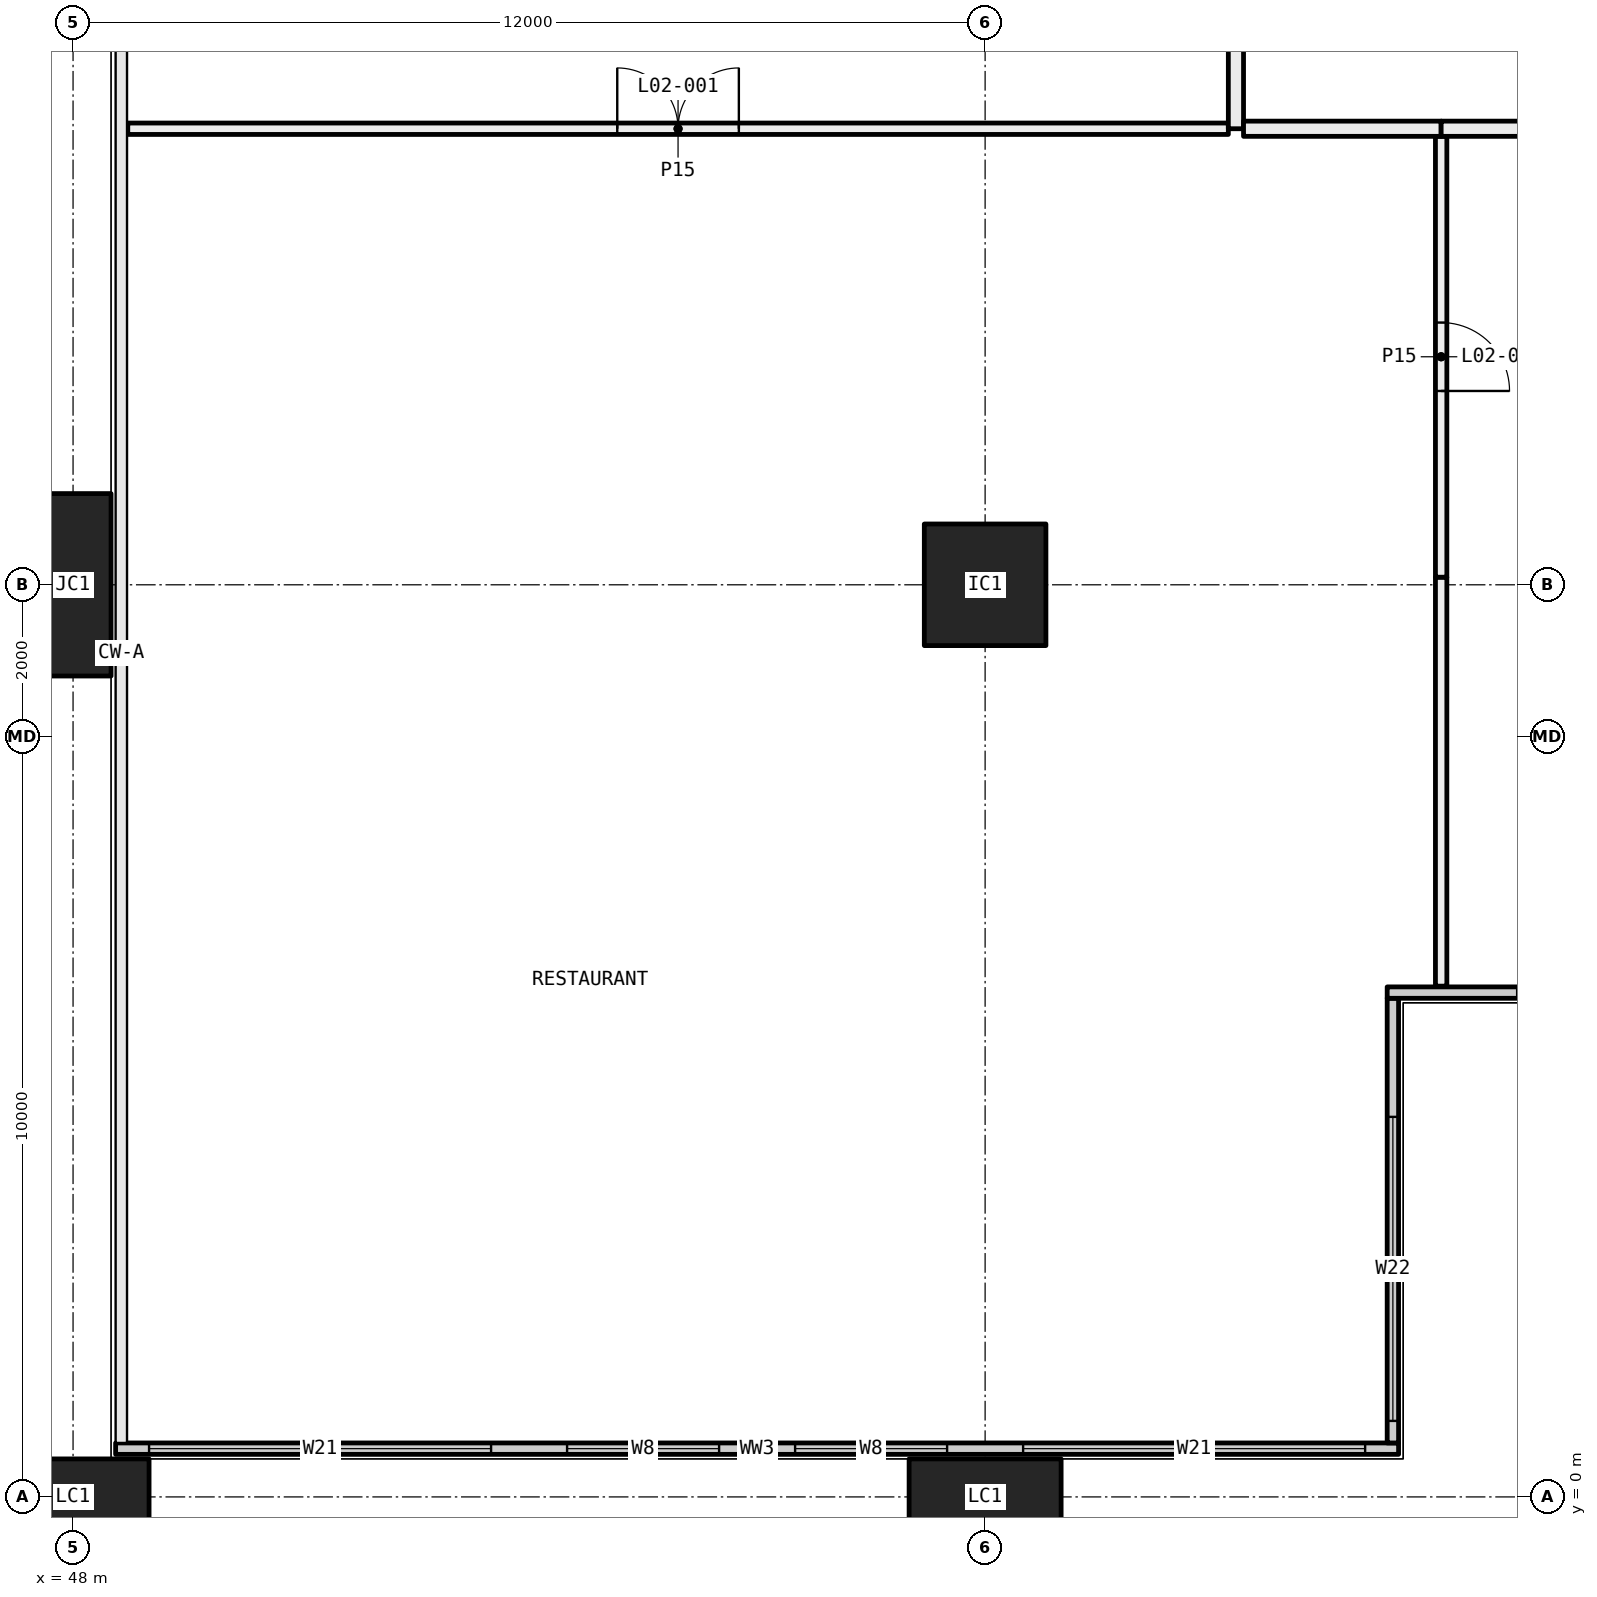
"""IFC4 building model, lengths in metres.
Left out: names, types, materials, properties, quantities, classifications, styles, units other than length and angle.
Written with IfcOpenShell. Run it as: python <this file> out.ifc"""

import sys

from ifc_helpers import new_model, si_unit, direction, frame, frame_2d, origin, origin_2d, place, context, subcontext, project, spatial, rectangle, hollow_rectangle, extrude, element, fill, save


model = new_model("IFC4")
c1 = context("Model", 3, precision=1e-05, world=origin(), true_north=direction((0.0, 1.0)))
c2 = subcontext(c1, "Body", "Model", "MODEL_VIEW")
j1 = project(units=[si_unit("LENGTHUNIT", "METRE"), si_unit("PLANEANGLEUNIT", "RADIAN")], contexts=[c1])
p1 = place(None, origin())
s1 = spatial("IfcSite", under=j1, at=p1, CompositionType="ELEMENT")
p2 = place(p1, origin())
s2 = spatial("IfcBuilding", under=s1, at=p2, CompositionType="ELEMENT")
p3 = place(p2, frame((0.0, 0.0, 12.0)))
s3 = spatial("IfcBuildingStorey", under=s2, at=p3, CompositionType="ELEMENT", Elevation=12.0)
p4 = place(p3, frame((48.0, 0.0, -0.4), z_axis=(0.0, 0.0, 1.0), x_axis=(1.0, 0.0, 0.0)))
e1 = element("IfcColumn", 1, at=p4, inside=s3, PredefinedType="COLUMN", context=c2, shape_type="SweptSolid", body=[
    extrude(hollow_rectangle(XDim=2.0, YDim=1.0, WallThickness=0.08, at=origin_2d()), origin(), (0.0, 0.0, 1.0), 6.0),
])
p5 = place(p3, frame((48.0, 12.0, -0.4), z_axis=(0.0, 0.0, 1.0), x_axis=(0.0, 1.0, 0.0)))
e2 = element("IfcColumn", 2, at=p5, inside=s3, PredefinedType="COLUMN", context=c2, shape_type="SweptSolid", body=[
    extrude(hollow_rectangle(XDim=2.4, YDim=1.0, WallThickness=0.09, at=origin_2d()), origin(), (0.0, 0.0, 1.0), 6.0),
])
p6 = place(p3, frame((60.0, 0.0, -0.4), z_axis=(0.0, 0.0, 1.0), x_axis=(1.0, 0.0, 0.0)))
e3 = element("IfcColumn", 3, at=p6, inside=s3, PredefinedType="COLUMN", context=c2, shape_type="SweptSolid", body=[
    extrude(hollow_rectangle(XDim=2.0, YDim=1.0, WallThickness=0.08, at=origin_2d()), origin(), (0.0, 0.0, 1.0), 6.0),
])
p7 = place(p3, frame((60.0, 12.0, 0.0), z_axis=(0.0, 0.0, 1.0), x_axis=(1.0, 0.0, 0.0)))
e4 = element("IfcColumn", 4, at=p7, inside=s3, PredefinedType="COLUMN", context=c2, shape_type="SweptSolid", body=[
    extrude(hollow_rectangle(XDim=1.6, YDim=1.6, WallThickness=0.07, at=origin_2d()), origin(), (0.0, 0.0, 1.0), 5.6),
])
p8 = place(p3, frame((48.56, 0.635, 0.0), z_axis=(0.0, 0.0, 1.0), x_axis=(1.0, 0.0, 0.0)))
e5 = element("IfcWall", 5, at=p8, inside=s3, PredefinedType="ELEMENTEDWALL", context=c2, shape_type="SweptSolid", body=[
    extrude(rectangle(XDim=16.88, YDim=0.15, at=frame_2d((8.44, 0.0))), origin(), (0.0, 0.0, 1.0), 5.6),
])
p9 = place(p8, frame((0.44, 0.0, 0.45)))
e6 = element("IfcOpeningElement", 6, at=p9, cuts=e5, PredefinedType="OPENING", context=c2, shape_type="SweptSolid", body=[
    extrude(rectangle(XDim=4.5, YDim=5.1, at=frame_2d((2.25, 2.55))), frame((0.0, 0.085, 0.0), z_axis=(0.0, -1.0, 0.0), x_axis=(1.0, 0.0, 0.0)), (0.0, 0.0, 1.0), 0.17),
])
p10 = place(p8, frame((5.94, 0.0, 0.45)))
e7 = element("IfcOpeningElement", 7, at=p10, cuts=e5, PredefinedType="OPENING", context=c2, shape_type="SweptSolid", body=[
    extrude(rectangle(XDim=2.0, YDim=5.1, at=frame_2d((1.0, 2.55))), frame((0.0, 0.085, 0.0), z_axis=(0.0, -1.0, 0.0), x_axis=(1.0, 0.0, 0.0)), (0.0, 0.0, 1.0), 0.17),
])
p11 = place(p8, frame((8.94, 0.0, 0.45)))
e8 = element("IfcOpeningElement", 8, at=p11, cuts=e5, PredefinedType="OPENING", context=c2, shape_type="SweptSolid", body=[
    extrude(rectangle(XDim=2.0, YDim=5.1, at=frame_2d((1.0, 2.55))), frame((0.0, 0.085, 0.0), z_axis=(0.0, -1.0, 0.0), x_axis=(1.0, 0.0, 0.0)), (0.0, 0.0, 1.0), 0.17),
])
p12 = place(p8, frame((11.94, 0.0, 0.45)))
e9 = element("IfcOpeningElement", 9, at=p12, cuts=e5, PredefinedType="OPENING", context=c2, shape_type="SweptSolid", body=[
    extrude(rectangle(XDim=4.5, YDim=5.1, at=frame_2d((2.25, 2.55))), frame((0.0, 0.085, 0.0), z_axis=(0.0, -1.0, 0.0), x_axis=(1.0, 0.0, 0.0)), (0.0, 0.0, 1.0), 0.17),
])
p13 = place(p3, frame((65.365, 0.71, 0.0), z_axis=(0.0, 0.0, 1.0), x_axis=(0.0, 1.0, 0.0)))
e10 = element("IfcWall", 10, at=p13, inside=s3, PredefinedType="ELEMENTEDWALL", context=c2, shape_type="SweptSolid", body=[
    extrude(rectangle(XDim=5.85, YDim=0.15, at=frame_2d((2.925, 0.0))), origin(), (0.0, 0.0, 1.0), 5.6),
])
p14 = place(p13, frame((0.29, 0.0, 0.45)))
e11 = element("IfcOpeningElement", 11, at=p14, cuts=e10, PredefinedType="OPENING", context=c2, shape_type="SweptSolid", body=[
    extrude(rectangle(XDim=4.0, YDim=5.1, at=frame_2d((2.0, 2.55))), frame((0.0, 0.085, 0.0), z_axis=(0.0, -1.0, 0.0), x_axis=(1.0, 0.0, 0.0)), (0.0, 0.0, 1.0), 0.17),
])
p15 = place(p3, frame((65.29, 6.635, 0.0), z_axis=(0.0, 0.0, 1.0), x_axis=(1.0, 0.0, 0.0)))
e12 = element("IfcWall", 12, at=p15, inside=s3, PredefinedType="ELEMENTEDWALL", context=c2, shape_type="SweptSolid", body=[
    extrude(rectangle(XDim=6.15, YDim=0.15, at=frame_2d((3.075, 0.0))), origin(), (0.0, 0.0, 1.0), 5.6),
])
p16 = place(p15, frame((1.71, 0.0, 0.45)))
e13 = element("IfcOpeningElement", 13, at=p16, cuts=e12, PredefinedType="OPENING", context=c2, shape_type="SweptSolid", body=[
    extrude(rectangle(XDim=4.0, YDim=5.1, at=frame_2d((2.0, 2.55))), frame((0.0, 0.085, 0.0), z_axis=(0.0, -1.0, 0.0), x_axis=(1.0, 0.0, 0.0)), (0.0, 0.0, 1.0), 0.17),
])
p17 = place(p3, frame((48.72, 18.0, 0.0), z_axis=(0.0, 0.0, 1.0), x_axis=(1.0, 0.0, 0.0)))
e14 = element("IfcWall", 14, at=p17, inside=s3, PredefinedType="PARTITIONING", context=c2, shape_type="SweptSolid", body=[
    extrude(rectangle(XDim=14.48, YDim=0.15, at=frame_2d((7.24, 0.0))), origin(), (0.0, 0.0, 1.0), 5.6),
])
p18 = place(p17, frame((6.44, 0.0, 0.0)))
e15 = element("IfcOpeningElement", 15, at=p18, cuts=e14, PredefinedType="OPENING", context=c2, shape_type="SweptSolid", body=[
    extrude(rectangle(XDim=1.6, YDim=2.1, at=frame_2d((0.8, 1.05))), frame((0.0, 0.085, 0.0), z_axis=(0.0, -1.0, 0.0), x_axis=(1.0, 0.0, 0.0)), (0.0, 0.0, 1.0), 0.17),
])
p19 = place(p3, frame((63.3, 18.0, 0.0), z_axis=(0.0, 0.0, 1.0), x_axis=(0.0, 1.0, 0.0)))
e16 = element("IfcWall", 16, at=p19, inside=s3, PredefinedType="PARTITIONING", context=c2, shape_type="SweptSolid", body=[
    extrude(rectangle(XDim=6.0, YDim=0.2, at=frame_2d((3.0, 0.0))), origin(), (0.0, 0.0, 1.0), 5.0),
])
p20 = place(p19, frame((2.55, 0.0, 0.0)))
e17 = element("IfcOpeningElement", 17, at=p20, cuts=e16, PredefinedType="OPENING", context=c2, shape_type="SweptSolid", body=[
    extrude(rectangle(XDim=0.9, YDim=2.1, at=frame_2d((0.45, 1.05))), frame((0.0, 0.11, 0.0), z_axis=(0.0, -1.0, 0.0), x_axis=(1.0, 0.0, 0.0)), (0.0, 0.0, 1.0), 0.22),
])
p21 = place(p3, frame((66.0, 6.72, 0.0), z_axis=(0.0, 0.0, 1.0), x_axis=(0.0, 1.0, 0.0)))
e18 = element("IfcWall", 18, at=p21, inside=s3, PredefinedType="PARTITIONING", context=c2, shape_type="SweptSolid", body=[
    extrude(rectangle(XDim=5.38, YDim=0.15, at=frame_2d((2.69, 0.0))), origin(), (0.0, 0.0, 1.0), 5.0),
])
p22 = place(p3, frame((66.0, 12.1, 0.0), z_axis=(0.0, 0.0, 1.0), x_axis=(0.0, 1.0, 0.0)))
e19 = element("IfcWall", 19, at=p22, inside=s3, PredefinedType="PARTITIONING", context=c2, shape_type="SweptSolid", body=[
    extrude(rectangle(XDim=5.8, YDim=0.15, at=frame_2d((2.9, 0.0))), origin(), (0.0, 0.0, 1.0), 5.6),
])
p23 = place(p22, frame((2.45, 0.0, 0.0)))
e20 = element("IfcOpeningElement", 20, at=p23, cuts=e19, PredefinedType="OPENING", context=c2, shape_type="SweptSolid", body=[
    extrude(rectangle(XDim=0.9, YDim=2.1, at=frame_2d((0.45, 1.05))), frame((0.0, 0.085, 0.0), z_axis=(0.0, -1.0, 0.0), x_axis=(1.0, 0.0, 0.0)), (0.0, 0.0, 1.0), 0.17),
])
p24 = place(p3, frame((66.0, 18.0, 0.0), z_axis=(0.0, 0.0, 1.0), x_axis=(-1.0, 0.0, 0.0)))
e21 = element("IfcWall", 21, at=p24, inside=s3, PredefinedType="PARTITIONING", context=c2, shape_type="SweptSolid", body=[
    extrude(rectangle(XDim=2.6, YDim=0.2, at=frame_2d((1.3, 0.0))), origin(), (0.0, 0.0, 1.0), 5.6),
])
p25 = place(p3, frame((71.28, 18.0, 0.0), z_axis=(0.0, 0.0, 1.0), x_axis=(-1.0, 0.0, 0.0)))
e22 = element("IfcWall", 22, at=p25, inside=s3, PredefinedType="PARTITIONING", context=c2, shape_type="SweptSolid", body=[
    extrude(rectangle(XDim=5.28, YDim=0.2, at=frame_2d((2.64, 0.0))), origin(), (0.0, 0.0, 1.0), 5.6),
])
p26 = place(p9, origin())
e23 = element("IfcWindow", 23, at=p26, inside=s3, PartitioningType="SINGLE_PANEL", PredefinedType="WINDOW", context=c2, shape_type="SweptSolid", body=[
    extrude(rectangle(XDim=4.5, YDim=5.1, at=frame_2d((2.25, 2.55))), frame((0.0, 0.03, 0.0), z_axis=(0.0, -1.0, 0.0), x_axis=(1.0, 0.0, 0.0)), (0.0, 0.0, 1.0), 0.06),
])
fill(e6, e23)
p27 = place(p10, origin())
e24 = element("IfcWindow", 24, at=p27, inside=s3, PartitioningType="SINGLE_PANEL", PredefinedType="WINDOW", context=c2, shape_type="SweptSolid", body=[
    extrude(rectangle(XDim=2.0, YDim=5.1, at=frame_2d((1.0, 2.55))), frame((0.0, 0.03, 0.0), z_axis=(0.0, -1.0, 0.0), x_axis=(1.0, 0.0, 0.0)), (0.0, 0.0, 1.0), 0.06),
])
fill(e7, e24)
p28 = place(p11, origin())
e25 = element("IfcWindow", 25, at=p28, inside=s3, PartitioningType="SINGLE_PANEL", PredefinedType="WINDOW", context=c2, shape_type="SweptSolid", body=[
    extrude(rectangle(XDim=2.0, YDim=5.1, at=frame_2d((1.0, 2.55))), frame((0.0, 0.03, 0.0), z_axis=(0.0, -1.0, 0.0), x_axis=(1.0, 0.0, 0.0)), (0.0, 0.0, 1.0), 0.06),
])
fill(e8, e25)
p29 = place(p12, origin())
e26 = element("IfcWindow", 26, at=p29, inside=s3, PartitioningType="SINGLE_PANEL", PredefinedType="WINDOW", context=c2, shape_type="SweptSolid", body=[
    extrude(rectangle(XDim=4.5, YDim=5.1, at=frame_2d((2.25, 2.55))), frame((0.0, 0.03, 0.0), z_axis=(0.0, -1.0, 0.0), x_axis=(1.0, 0.0, 0.0)), (0.0, 0.0, 1.0), 0.06),
])
fill(e9, e26)
p30 = place(p14, origin())
e27 = element("IfcWindow", 27, at=p30, inside=s3, PartitioningType="SINGLE_PANEL", PredefinedType="WINDOW", context=c2, shape_type="SweptSolid", body=[
    extrude(rectangle(XDim=4.0, YDim=5.1, at=frame_2d((2.0, 2.55))), frame((0.0, 0.03, 0.0), z_axis=(0.0, -1.0, 0.0), x_axis=(1.0, 0.0, 0.0)), (0.0, 0.0, 1.0), 0.06),
])
fill(e11, e27)
p31 = place(p18, origin())
e28 = element("IfcDoor", 28, at=p31, inside=s3, OperationType="DOUBLE_DOOR_SINGLE_SWING", PredefinedType="DOOR", context=c2, shape_type="SweptSolid", body=[
    extrude(rectangle(XDim=1.6, YDim=2.1, at=frame_2d((0.8, 1.05))), frame((0.0, 0.025, 0.0), z_axis=(0.0, -1.0, 0.0), x_axis=(1.0, 0.0, 0.0)), (0.0, 0.0, 1.0), 0.05),
])
fill(e15, e28)
p32 = place(p23, frame((0.9, 0.0, 0.0), x_axis=(-1.0, 0.0, 0.0)))
e29 = element("IfcDoor", 29, at=p32, inside=s3, OperationType="SINGLE_SWING_LEFT", PredefinedType="DOOR", context=c2, shape_type="SweptSolid", body=[
    extrude(rectangle(XDim=0.9, YDim=2.1, at=frame_2d((0.45, 1.05))), frame((0.0, 0.025, 0.0), z_axis=(0.0, -1.0, 0.0), x_axis=(1.0, 0.0, 0.0)), (0.0, 0.0, 1.0), 0.05),
])
fill(e20, e29)
save(model, sys.argv[1])
